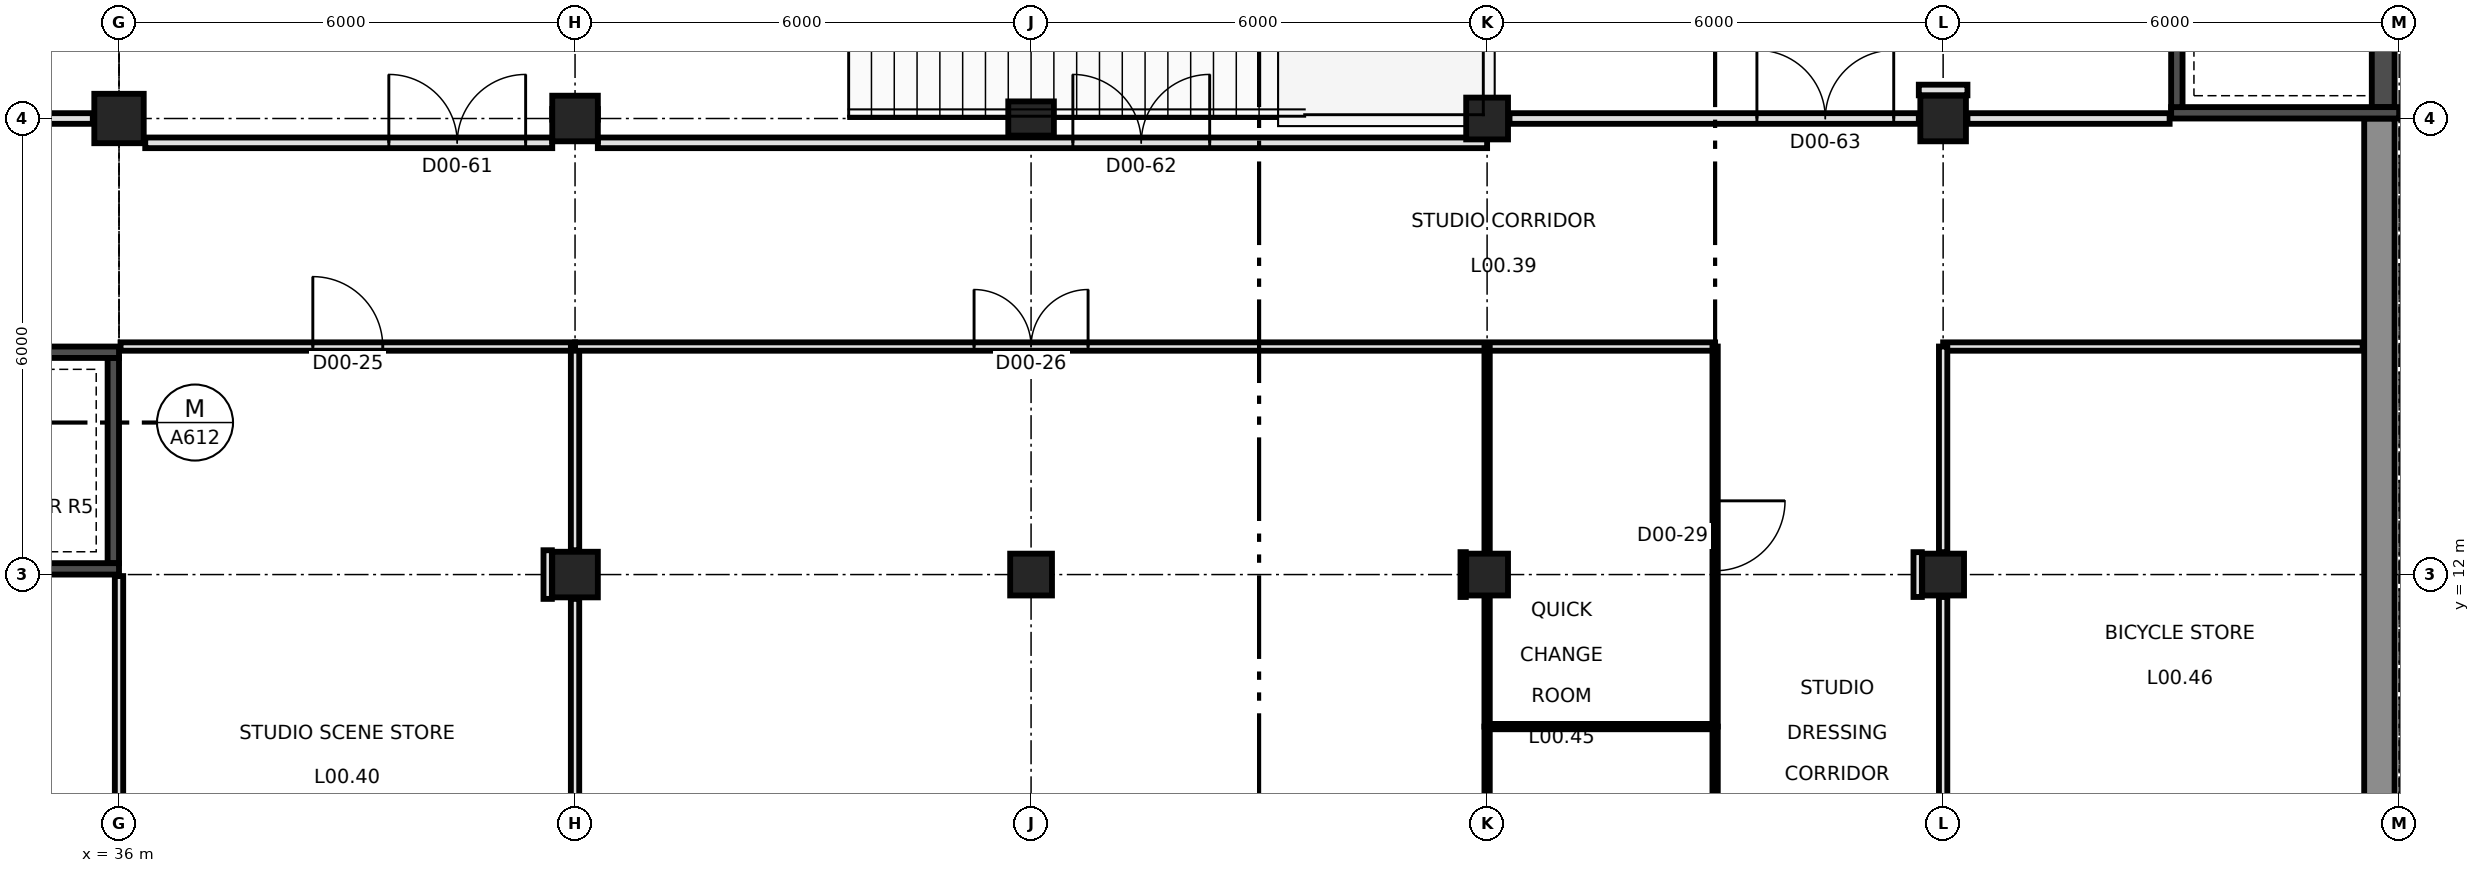
"""IFC4 building model, lengths in metres.
Left out: names, types, materials, properties, quantities, classifications, styles, units other than length and angle.
Written with IfcOpenShell. Run it as: python <this file> out.ifc"""

import sys

from ifc_helpers import new_model, si_unit, direction, frame, frame_2d, origin, origin_2d, place, context, subcontext, project, spatial, rectangle, extrude, element, fill, save


model = new_model("IFC4")
c1 = context("Model", 3, precision=1e-05, world=origin(), true_north=direction((0.0, 1.0)))
c2 = subcontext(c1, "Body", "Model", "MODEL_VIEW")
j1 = project(units=[si_unit("LENGTHUNIT", "METRE"), si_unit("PLANEANGLEUNIT", "RADIAN")], contexts=[c1])
p1 = place(None, origin())
s1 = spatial("IfcSite", under=j1, at=p1, CompositionType="ELEMENT")
p2 = place(p1, origin())
s2 = spatial("IfcBuilding", under=s1, at=p2, CompositionType="ELEMENT")
p3 = place(p2, origin())
s3 = spatial("IfcBuildingStorey", under=s2, at=p3, CompositionType="ELEMENT", Elevation=0.0)
p4 = place(p3, frame((42.0, 12.0, -0.3), z_axis=(0.0, 0.0, 1.0), x_axis=(1.0, 0.0, 0.0)))
e1 = element("IfcColumn", 1, at=p4, inside=s3, PredefinedType="COLUMN", context=c2, shape_type="SweptSolid", body=[
    extrude(rectangle(XDim=0.6, YDim=0.6, at=origin_2d()), origin(), (0.0, 0.0, 1.0), 7.3),
])
for number, where, z_axis, x_axis in (
    (2, (48.0, 12.0, -0.3), (0.0, 0.0, 1.0), (1.0, 0.0, 0.0)),
    (3, (54.0, 12.0, -0.3), (0.0, 0.0, 1.0), (1.0, 0.0, 0.0)),
    (4, (60.0, 12.0, -0.3), (0.0, 0.0, 1.0), (1.0, 0.0, 0.0)),
):
    element("IfcColumn", number, at=place(p3, frame(where, z_axis=z_axis, x_axis=x_axis)), inside=s3, PredefinedType="COLUMN", context=c2, shape_type="SweptSolid", body=[
        extrude(rectangle(XDim=0.55, YDim=0.55, at=origin_2d()), origin(), (0.0, 0.0, 1.0), 7.3),
    ])
p5 = place(p3, frame((36.0, 18.0, -0.3), z_axis=(0.0, 0.0, 1.0), x_axis=(1.0, 0.0, 0.0)))
e5 = element("IfcColumn", 5, at=p5, inside=s3, PredefinedType="COLUMN", context=c2, shape_type="SweptSolid", body=[
    extrude(rectangle(XDim=0.65, YDim=0.65, at=origin_2d()), origin(), (0.0, 0.0, 1.0), 7.3),
])
p6 = place(p3, frame((42.0, 18.0, -0.3), z_axis=(0.0, 0.0, 1.0), x_axis=(1.0, 0.0, 0.0)))
e6 = element("IfcColumn", 6, at=p6, inside=s3, PredefinedType="COLUMN", context=c2, shape_type="SweptSolid", body=[
    extrude(rectangle(XDim=0.6, YDim=0.6, at=origin_2d()), origin(), (0.0, 0.0, 1.0), 7.3),
])
p7 = place(p3, frame((48.0, 18.0, -0.3), z_axis=(0.0, 0.0, 1.0), x_axis=(1.0, 0.0, 0.0)))
e7 = element("IfcColumn", 7, at=p7, inside=s3, PredefinedType="COLUMN", context=c2, shape_type="SweptSolid", body=[
    extrude(rectangle(XDim=0.6, YDim=0.45, at=origin_2d()), origin(), (0.0, 0.0, 1.0), 7.3),
])
p8 = place(p3, frame((54.0, 18.0, -0.3), z_axis=(0.0, 0.0, 1.0), x_axis=(1.0, 0.0, 0.0)))
e8 = element("IfcColumn", 8, at=p8, inside=s3, PredefinedType="COLUMN", context=c2, shape_type="SweptSolid", body=[
    extrude(rectangle(XDim=0.55, YDim=0.55, at=origin_2d()), origin(), (0.0, 0.0, 1.0), 7.3),
])
p9 = place(p3, frame((60.0, 18.0, -0.3), z_axis=(0.0, 0.0, 1.0), x_axis=(1.0, 0.0, 0.0)))
e9 = element("IfcColumn", 9, at=p9, inside=s3, PredefinedType="COLUMN", context=c2, shape_type="SweptSolid", body=[
    extrude(rectangle(XDim=0.6, YDim=0.6, at=origin_2d()), origin(), (0.0, 0.0, 1.0), 7.3),
])
p10 = place(p3, frame((33.0, 14.925, -0.3), z_axis=(0.0, 0.0, 1.0), x_axis=(1.0, 0.0, 0.0)))
e10 = element("IfcWall", 10, at=p10, inside=s3, PredefinedType="SHEAR", context=c2, shape_type="SweptSolid", body=[
    extrude(rectangle(XDim=3.0, YDim=0.15, at=frame_2d((1.5, 0.0))), origin(), (0.0, 0.0, 1.0), 7.3),
])
p11 = place(p10, frame((1.15, 0.0, 0.3)))
e11 = element("IfcOpeningElement", 11, at=p11, cuts=e10, PredefinedType="OPENING", context=c2, shape_type="SweptSolid", body=[
    extrude(rectangle(XDim=0.6, YDim=2.04, at=frame_2d((0.3, 1.02))), frame((0.0, 0.085, 0.0), z_axis=(0.0, -1.0, 0.0), x_axis=(1.0, 0.0, 0.0)), (0.0, 0.0, 1.0), 0.17),
])
p12 = place(p3, frame((33.0, 12.075, -0.3), z_axis=(0.0, 0.0, 1.0), x_axis=(1.0, 0.0, 0.0)))
e12 = element("IfcWall", 12, at=p12, inside=s3, PredefinedType="SHEAR", context=c2, shape_type="SweptSolid", body=[
    extrude(rectangle(XDim=3.0, YDim=0.15, at=frame_2d((1.5, 0.0))), origin(), (0.0, 0.0, 1.0), 7.3),
])
p13 = place(p3, frame((35.925, 12.15, -0.3), z_axis=(0.0, 0.0, 1.0), x_axis=(0.0, 1.0, 0.0)))
e13 = element("IfcWall", 13, at=p13, inside=s3, PredefinedType="SHEAR", context=c2, shape_type="SweptSolid", body=[
    extrude(rectangle(XDim=2.7, YDim=0.15, at=frame_2d((1.35, 0.0))), origin(), (0.0, 0.0, 1.0), 7.3),
])
p14 = place(p3, frame((63.0, 18.075, -0.3), z_axis=(0.0, 0.0, 1.0), x_axis=(1.0, 0.0, 0.0)))
e14 = element("IfcWall", 14, at=p14, inside=s3, PredefinedType="SHEAR", context=c2, shape_type="SweptSolid", body=[
    extrude(rectangle(XDim=3.0, YDim=0.15, at=frame_2d((1.5, 0.0))), origin(), (0.0, 0.0, 1.0), 7.3),
])
p15 = place(p3, frame((63.075, 18.15, -0.3), z_axis=(0.0, 0.0, 1.0), x_axis=(0.0, 1.0, 0.0)))
e15 = element("IfcWall", 15, at=p15, inside=s3, PredefinedType="SHEAR", context=c2, shape_type="SweptSolid", body=[
    extrude(rectangle(XDim=5.7, YDim=0.15, at=frame_2d((2.85, 0.0))), origin(), (0.0, 0.0, 1.0), 7.3),
])
p16 = place(p15, frame((2.5, 0.0, 0.3)))
e16 = element("IfcOpeningElement", 16, at=p16, cuts=e15, PredefinedType="OPENING", context=c2, shape_type="SweptSolid", body=[
    extrude(rectangle(XDim=0.6, YDim=2.04, at=frame_2d((0.3, 1.02))), frame((0.0, 0.085, 0.0), z_axis=(0.0, -1.0, 0.0), x_axis=(1.0, 0.0, 0.0)), (0.0, 0.0, 1.0), 0.17),
])
p17 = place(p3, frame((65.79, 18.15, -0.3), z_axis=(0.0, 0.0, 1.0), x_axis=(0.0, 1.0, 0.0)))
e17 = element("IfcWall", 17, at=p17, inside=s3, PredefinedType="SHEAR", context=c2, shape_type="SweptSolid", body=[
    extrude(rectangle(XDim=5.7, YDim=0.3, at=frame_2d((2.85, 0.0))), origin(), (0.0, 0.0, 1.0), 7.3),
])
p18 = place(p3, frame((65.74, 0.0, -0.3), z_axis=(0.0, 0.0, 1.0), x_axis=(0.0, 1.0, 0.0)))
e18 = element("IfcWall", 18, at=p18, inside=s3, PredefinedType="SOLIDWALL", context=c2, shape_type="SweptSolid", body=[
    extrude(rectangle(XDim=18.0, YDim=0.4, at=frame_2d((9.0, 0.0))), origin(), (0.0, 0.0, 1.0), 7.3),
])
p19 = place(p3, frame((36.0, 6.02, 0.0), z_axis=(0.0, 0.0, 1.0), x_axis=(0.0, 1.0, 0.0)))
e19 = element("IfcWall", 19, at=p19, inside=s3, PredefinedType="PARTITIONING", context=c2, shape_type="SweptSolid", body=[
    extrude(rectangle(XDim=5.96, YDim=0.11, at=frame_2d((2.98, 0.0))), origin(), (0.0, 0.0, 1.0), 6.05),
])
p20 = place(p3, frame((36.02, 15.0, 0.0), z_axis=(0.0, 0.0, 1.0), x_axis=(1.0, 0.0, 0.0)))
e20 = element("IfcWall", 20, at=p20, inside=s3, PredefinedType="PARTITIONING", context=c2, shape_type="SweptSolid", body=[
    extrude(rectangle(XDim=5.98, YDim=0.11, at=frame_2d((2.99, 0.0))), origin(), (0.0, 0.0, 1.0), 6.15),
])
p21 = place(p20, frame((2.53, 0.0, 0.0)))
e21 = element("IfcOpeningElement", 21, at=p21, cuts=e20, PredefinedType="OPENING", context=c2, shape_type="SweptSolid", body=[
    extrude(rectangle(XDim=0.92, YDim=2.04, at=frame_2d((0.46, 1.02))), frame((0.0, 0.065, 0.0), z_axis=(0.0, -1.0, 0.0), x_axis=(1.0, 0.0, 0.0)), (0.0, 0.0, 1.0), 0.13),
])
p22 = place(p3, frame((42.0, 12.32, 0.0), z_axis=(0.0, 0.0, 1.0), x_axis=(0.0, 1.0, 0.0)))
e22 = element("IfcWall", 22, at=p22, inside=s3, PredefinedType="PARTITIONING", context=c2, shape_type="SweptSolid", body=[
    extrude(rectangle(XDim=2.68, YDim=0.11, at=frame_2d((1.34, 0.0))), origin(), (0.0, 0.0, 1.0), 6.15),
])
p23 = place(p3, frame((42.0, 6.02, 0.0), z_axis=(0.0, 0.0, 1.0), x_axis=(0.0, 1.0, 0.0)))
e23 = element("IfcWall", 23, at=p23, inside=s3, PredefinedType="PARTITIONING", context=c2, shape_type="SweptSolid", body=[
    extrude(rectangle(XDim=5.66, YDim=0.11, at=frame_2d((2.83, 0.0))), origin(), (0.0, 0.0, 1.0), 6.15),
])
p24 = place(p3, frame((41.64, 11.68, 0.0), z_axis=(0.0, 0.0, 1.0), x_axis=(0.0, 1.0, 0.0)))
e24 = element("IfcWall", 24, at=p24, inside=s3, PredefinedType="PARTITIONING", context=c2, shape_type="SweptSolid", body=[
    extrude(rectangle(XDim=0.64, YDim=0.11, at=frame_2d((0.32, 0.0))), origin(), (0.0, 0.0, 1.0), 6.15),
])
p25 = place(p3, frame((42.0, 15.0, 0.0), z_axis=(0.0, 0.0, 1.0), x_axis=(1.0, 0.0, 0.0)))
e25 = element("IfcWall", 25, at=p25, inside=s3, PredefinedType="PARTITIONING", context=c2, shape_type="SweptSolid", body=[
    extrude(rectangle(XDim=15.0, YDim=0.11, at=frame_2d((7.5, 0.0))), origin(), (0.0, 0.0, 1.0), 6.15),
])
p26 = place(p25, frame((5.25, 0.0, 0.0)))
e26 = element("IfcOpeningElement", 26, at=p26, cuts=e25, PredefinedType="OPENING", context=c2, shape_type="SweptSolid", body=[
    extrude(rectangle(XDim=1.5, YDim=2.1, at=frame_2d((0.75, 1.05))), frame((0.0, 0.065, 0.0), z_axis=(0.0, -1.0, 0.0), x_axis=(1.0, 0.0, 0.0)), (0.0, 0.0, 1.0), 0.13),
])
p27 = place(p3, frame((60.0, 15.0, 0.0), z_axis=(0.0, 0.0, 1.0), x_axis=(1.0, 0.0, 0.0)))
e27 = element("IfcWall", 27, at=p27, inside=s3, PredefinedType="PARTITIONING", context=c2, shape_type="SweptSolid", body=[
    extrude(rectangle(XDim=5.52, YDim=0.11, at=frame_2d((2.76, 0.0))), origin(), (0.0, 0.0, 1.0), 6.15),
])
p28 = place(p3, frame((60.0, 12.295, 0.0), z_axis=(0.0, 0.0, 1.0), x_axis=(0.0, 1.0, 0.0)))
e28 = element("IfcWall", 28, at=p28, inside=s3, PredefinedType="PARTITIONING", context=c2, shape_type="SweptSolid", body=[
    extrude(rectangle(XDim=2.705, YDim=0.11, at=frame_2d((1.353, 0.0))), origin(), (0.0, 0.0, 1.0), 6.15),
])
p29 = place(p3, frame((60.0, 6.295, 0.0), z_axis=(0.0, 0.0, 1.0), x_axis=(0.0, 1.0, 0.0)))
e29 = element("IfcWall", 29, at=p29, inside=s3, PredefinedType="PARTITIONING", context=c2, shape_type="SweptSolid", body=[
    extrude(rectangle(XDim=5.41, YDim=0.11, at=frame_2d((2.705, 0.0))), origin(), (0.0, 0.0, 1.0), 6.15),
])
p30 = place(p29, frame((0.655, 0.0, 0.0)))
e30 = element("IfcOpeningElement", 30, at=p30, cuts=e29, PredefinedType="OPENING", context=c2, shape_type="SweptSolid", body=[
    extrude(rectangle(XDim=1.0, YDim=2.1, at=frame_2d((0.5, 1.05))), frame((0.0, 0.065, 0.0), z_axis=(0.0, -1.0, 0.0), x_axis=(1.0, 0.0, 0.0)), (0.0, 0.0, 1.0), 0.13),
])
p31 = place(p3, frame((59.665, 11.705, 0.0), z_axis=(0.0, 0.0, 1.0), x_axis=(0.0, 1.0, 0.0)))
e31 = element("IfcWall", 31, at=p31, inside=s3, PredefinedType="PARTITIONING", context=c2, shape_type="SweptSolid", body=[
    extrude(rectangle(XDim=0.59, YDim=0.11, at=frame_2d((0.295, 0.0))), origin(), (0.0, 0.0, 1.0), 6.15),
])
p32 = place(p3, frame((30.345, 18.0, 0.0), z_axis=(0.0, 0.0, 1.0), x_axis=(1.0, 0.0, 0.0)))
e32 = element("IfcWall", 32, at=p32, inside=s3, PredefinedType="PARTITIONING", context=c2, shape_type="SweptSolid", body=[
    extrude(rectangle(XDim=5.31, YDim=0.14, at=frame_2d((2.655, 0.0))), origin(), (0.0, 0.0, 1.0), 6.05),
])
p33 = place(p32, frame((1.705, 0.0, 0.0)))
e33 = element("IfcOpeningElement", 33, at=p33, cuts=e32, PredefinedType="OPENING", context=c2, shape_type="SweptSolid", body=[
    extrude(rectangle(XDim=1.8, YDim=2.1, at=frame_2d((0.9, 1.05))), frame((0.0, 0.08, 0.0), z_axis=(0.0, -1.0, 0.0), x_axis=(1.0, 0.0, 0.0)), (0.0, 0.0, 1.0), 0.16),
])
p34 = place(p3, frame((36.345, 17.68, 0.0), z_axis=(0.0, 0.0, 1.0), x_axis=(1.0, 0.0, 0.0)))
e34 = element("IfcWall", 34, at=p34, inside=s3, PredefinedType="PARTITIONING", context=c2, shape_type="SweptSolid", body=[
    extrude(rectangle(XDim=5.355, YDim=0.14, at=frame_2d((2.677, 0.0))), origin(), (0.0, 0.0, 1.0), 6.3),
])
p35 = place(p34, frame((3.205, 0.0, 0.0)))
e35 = element("IfcOpeningElement", 35, at=p35, cuts=e34, PredefinedType="OPENING", context=c2, shape_type="SweptSolid", body=[
    extrude(rectangle(XDim=1.8, YDim=2.1, at=frame_2d((0.9, 1.05))), frame((0.0, 0.08, 0.0), z_axis=(0.0, -1.0, 0.0), x_axis=(1.0, 0.0, 0.0)), (0.0, 0.0, 1.0), 0.16),
])
p36 = place(p3, frame((42.3, 17.68, 0.0), z_axis=(0.0, 0.0, 1.0), x_axis=(1.0, 0.0, 0.0)))
e36 = element("IfcWall", 36, at=p36, inside=s3, PredefinedType="PARTITIONING", context=c2, shape_type="SweptSolid", body=[
    extrude(rectangle(XDim=11.7, YDim=0.14, at=frame_2d((5.85, 0.0))), origin(), (0.0, 0.0, 1.0), 2.75),
])
p37 = place(p36, frame((6.25, 0.0, 0.0)))
e37 = element("IfcOpeningElement", 37, at=p37, cuts=e36, PredefinedType="OPENING", context=c2, shape_type="SweptSolid", body=[
    extrude(rectangle(XDim=1.8, YDim=2.1, at=frame_2d((0.9, 1.05))), frame((0.0, 0.08, 0.0), z_axis=(0.0, -1.0, 0.0), x_axis=(1.0, 0.0, 0.0)), (0.0, 0.0, 1.0), 0.16),
])
p38 = place(p3, frame((41.7, 18.055, 0.0), z_axis=(0.0, 0.0, 1.0), x_axis=(1.0, 0.0, 0.0)))
e38 = element("IfcWall", 38, at=p38, inside=s3, PredefinedType="PARTITIONING", context=c2, shape_type="SweptSolid", body=[
    extrude(rectangle(XDim=0.6, YDim=0.14, at=frame_2d((0.3, 0.0))), origin(), (0.0, 0.0, 1.0), 2.75),
])
p39 = place(p3, frame((54.295, 18.0, 0.0), z_axis=(0.0, 0.0, 1.0), x_axis=(1.0, 0.0, 0.0)))
e39 = element("IfcWall", 39, at=p39, inside=s3, PredefinedType="PARTITIONING", context=c2, shape_type="SweptSolid", body=[
    extrude(rectangle(XDim=5.385, YDim=0.14, at=frame_2d((2.692, 0.0))), origin(), (0.0, 0.0, 1.0), 2.75),
])
p40 = place(p39, frame((3.255, 0.0, 0.0)))
e40 = element("IfcOpeningElement", 40, at=p40, cuts=e39, PredefinedType="OPENING", context=c2, shape_type="SweptSolid", body=[
    extrude(rectangle(XDim=1.8, YDim=2.1, at=frame_2d((0.9, 1.05))), frame((0.0, 0.08, 0.0), z_axis=(0.0, -1.0, 0.0), x_axis=(1.0, 0.0, 0.0)), (0.0, 0.0, 1.0), 0.16),
])
p41 = place(p3, frame((60.32, 18.0, 0.0), z_axis=(0.0, 0.0, 1.0), x_axis=(1.0, 0.0, 0.0)))
e41 = element("IfcWall", 41, at=p41, inside=s3, PredefinedType="PARTITIONING", context=c2, shape_type="SweptSolid", body=[
    extrude(rectangle(XDim=2.66, YDim=0.14, at=frame_2d((1.33, 0.0))), origin(), (0.0, 0.0, 1.0), 6.15),
])
p42 = place(p3, frame((59.68, 18.375, 0.0), z_axis=(0.0, 0.0, 1.0), x_axis=(1.0, 0.0, 0.0)))
e42 = element("IfcWall", 42, at=p42, inside=s3, PredefinedType="PARTITIONING", context=c2, shape_type="SweptSolid", body=[
    extrude(rectangle(XDim=0.64, YDim=0.14, at=frame_2d((0.32, 0.0))), origin(), (0.0, 0.0, 1.0), 6.15),
])
p43 = place(p3, frame((54.0, 6.295, 0.0), z_axis=(0.0, 0.0, 1.0), x_axis=(0.0, 1.0, 0.0)))
e43 = element("IfcWall", 43, at=p43, inside=s3, PredefinedType="PARTITIONING", context=c2, shape_type="SweptSolid", body=[
    extrude(rectangle(XDim=3.705, YDim=0.07, at=frame_2d((1.853, 0.0))), origin(), (0.0, 0.0, 1.0), 6.15),
])
p44 = place(p3, frame((54.0, 10.0, 0.0), z_axis=(0.0, 0.0, 1.0), x_axis=(1.0, 0.0, 0.0)))
e44 = element("IfcWall", 44, at=p44, inside=s3, PredefinedType="PARTITIONING", context=c2, shape_type="SweptSolid", body=[
    extrude(rectangle(XDim=3.0, YDim=0.07, at=frame_2d((1.5, 0.0))), origin(), (0.0, 0.0, 1.0), 6.15),
])
p45 = place(p3, frame((54.0, 12.295, 0.0), z_axis=(0.0, 0.0, 1.0), x_axis=(0.0, 1.0, 0.0)))
e45 = element("IfcWall", 45, at=p45, inside=s3, PredefinedType="PARTITIONING", context=c2, shape_type="SweptSolid", body=[
    extrude(rectangle(XDim=2.705, YDim=0.07, at=frame_2d((1.353, 0.0))), origin(), (0.0, 0.0, 1.0), 6.15),
])
p46 = place(p3, frame((54.0, 10.0, 0.0), z_axis=(0.0, 0.0, 1.0), x_axis=(0.0, 1.0, 0.0)))
e46 = element("IfcWall", 46, at=p46, inside=s3, PredefinedType="PARTITIONING", context=c2, shape_type="SweptSolid", body=[
    extrude(rectangle(XDim=1.705, YDim=0.07, at=frame_2d((0.853, 0.0))), origin(), (0.0, 0.0, 1.0), 6.15),
])
p47 = place(p3, frame((53.685, 11.705, 0.0), z_axis=(0.0, 0.0, 1.0), x_axis=(0.0, 1.0, 0.0)))
e47 = element("IfcWall", 47, at=p47, inside=s3, PredefinedType="PARTITIONING", context=c2, shape_type="SweptSolid", body=[
    extrude(rectangle(XDim=0.59, YDim=0.07, at=frame_2d((0.295, 0.0))), origin(), (0.0, 0.0, 1.0), 6.15),
])
p48 = place(p3, frame((57.0, 5.0, 0.0), z_axis=(0.0, 0.0, 1.0), x_axis=(0.0, 1.0, 0.0)))
e48 = element("IfcWall", 48, at=p48, inside=s3, PredefinedType="PARTITIONING", context=c2, shape_type="SweptSolid", body=[
    extrude(rectangle(XDim=5.0, YDim=0.07, at=frame_2d((2.5, 0.0))), origin(), (0.0, 0.0, 1.0), 6.15),
])
p49 = place(p48, frame((2.05, 0.0, 0.0)))
e49 = element("IfcOpeningElement", 49, at=p49, cuts=e48, PredefinedType="OPENING", context=c2, shape_type="SweptSolid", body=[
    extrude(rectangle(XDim=0.92, YDim=2.04, at=frame_2d((0.46, 1.02))), frame((0.0, 0.045, 0.0), z_axis=(0.0, -1.0, 0.0), x_axis=(1.0, 0.0, 0.0)), (0.0, 0.0, 1.0), 0.09),
])
p50 = place(p3, frame((57.0, 10.0, 0.0), z_axis=(0.0, 0.0, 1.0), x_axis=(0.0, 1.0, 0.0)))
e50 = element("IfcWall", 50, at=p50, inside=s3, PredefinedType="PARTITIONING", context=c2, shape_type="SweptSolid", body=[
    extrude(rectangle(XDim=5.0, YDim=0.07, at=frame_2d((2.5, 0.0))), origin(), (0.0, 0.0, 1.0), 6.15),
])
p51 = place(p50, frame((2.05, 0.0, 0.0)))
e51 = element("IfcOpeningElement", 51, at=p51, cuts=e50, PredefinedType="OPENING", context=c2, shape_type="SweptSolid", body=[
    extrude(rectangle(XDim=0.92, YDim=2.04, at=frame_2d((0.46, 1.02))), frame((0.0, 0.045, 0.0), z_axis=(0.0, -1.0, 0.0), x_axis=(1.0, 0.0, 0.0)), (0.0, 0.0, 1.0), 0.09),
])
p52 = place(p21, frame((0.92, 0.0, 0.0), z_axis=(0.0, 0.0, 1.0), x_axis=(-1.0, 0.0, 0.0)))
e52 = element("IfcDoor", 52, at=p52, inside=s3, OperationType="SINGLE_SWING_LEFT", PredefinedType="DOOR", context=c2, shape_type="SweptSolid", body=[
    extrude(rectangle(XDim=0.92, YDim=2.04, at=frame_2d((0.46, 1.02))), frame((0.0, 0.025, 0.0), z_axis=(0.0, -1.0, 0.0), x_axis=(1.0, 0.0, 0.0)), (0.0, 0.0, 1.0), 0.05),
])
fill(e21, e52)
p53 = place(p26, origin())
e53 = element("IfcDoor", 53, at=p53, inside=s3, OperationType="DOUBLE_DOOR_SINGLE_SWING", PredefinedType="DOOR", context=c2, shape_type="SweptSolid", body=[
    extrude(rectangle(XDim=1.5, YDim=2.1, at=frame_2d((0.75, 1.05))), frame((0.0, 0.025, 0.0), z_axis=(0.0, -1.0, 0.0), x_axis=(1.0, 0.0, 0.0)), (0.0, 0.0, 1.0), 0.05),
])
fill(e26, e53)
p54 = place(p51, origin())
e54 = element("IfcDoor", 54, at=p54, inside=s3, OperationType="SINGLE_SWING_RIGHT", PredefinedType="DOOR", context=c2, shape_type="SweptSolid", body=[
    extrude(rectangle(XDim=0.92, YDim=2.04, at=frame_2d((0.46, 1.02))), frame((0.0, 0.025, 0.0), z_axis=(0.0, -1.0, 0.0), x_axis=(1.0, 0.0, 0.0)), (0.0, 0.0, 1.0), 0.05),
])
fill(e51, e54)
p55 = place(p35, origin())
e55 = element("IfcDoor", 55, at=p55, inside=s3, OperationType="DOUBLE_DOOR_SINGLE_SWING", PredefinedType="DOOR", context=c2, shape_type="SweptSolid", body=[
    extrude(rectangle(XDim=1.8, YDim=2.1, at=frame_2d((0.9, 1.05))), frame((0.0, 0.025, 0.0), z_axis=(0.0, -1.0, 0.0), x_axis=(1.0, 0.0, 0.0)), (0.0, 0.0, 1.0), 0.05),
])
fill(e35, e55)
p56 = place(p37, origin())
e56 = element("IfcDoor", 56, at=p56, inside=s3, OperationType="DOUBLE_DOOR_SINGLE_SWING", PredefinedType="DOOR", context=c2, shape_type="SweptSolid", body=[
    extrude(rectangle(XDim=1.8, YDim=2.1, at=frame_2d((0.9, 1.05))), frame((0.0, 0.025, 0.0), z_axis=(0.0, -1.0, 0.0), x_axis=(1.0, 0.0, 0.0)), (0.0, 0.0, 1.0), 0.05),
])
fill(e37, e56)
p57 = place(p40, origin())
e57 = element("IfcDoor", 57, at=p57, inside=s3, OperationType="DOUBLE_DOOR_SINGLE_SWING", PredefinedType="DOOR", context=c2, shape_type="SweptSolid", body=[
    extrude(rectangle(XDim=1.8, YDim=2.1, at=frame_2d((0.9, 1.05))), frame((0.0, 0.025, 0.0), z_axis=(0.0, -1.0, 0.0), x_axis=(1.0, 0.0, 0.0)), (0.0, 0.0, 1.0), 0.05),
])
fill(e40, e57)
save(model, sys.argv[1])
